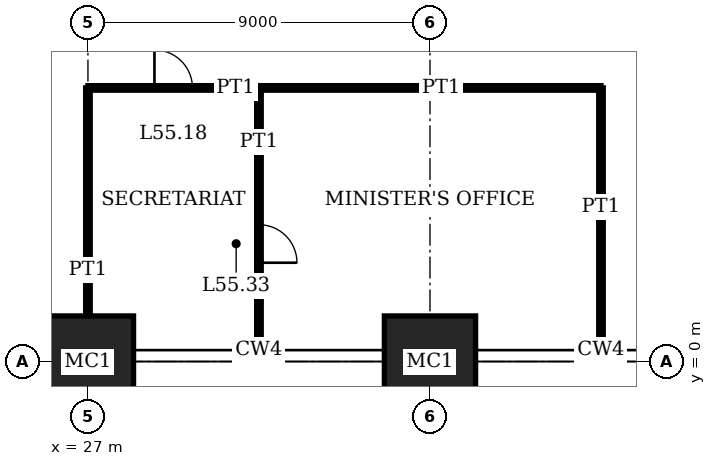
"""IFC4 building model, lengths in metres.
Left out: names, types, materials, properties, quantities, classifications, styles, units other than length and angle.
Written with IfcOpenShell. Run it as: python <this file> out.ifc"""

import sys

from ifc_helpers import new_model, si_unit, direction, frame, frame_2d, origin, origin_2d, place, context, subcontext, project, spatial, rectangle, extrude, element, fill, save


model = new_model("IFC4")
c1 = context("Model", 3, precision=1e-05, world=origin(), true_north=direction((0.0, 1.0)))
c2 = subcontext(c1, "Body", "Model", "MODEL_VIEW")
j1 = project(units=[si_unit("LENGTHUNIT", "METRE"), si_unit("PLANEANGLEUNIT", "RADIAN")], contexts=[c1])
p1 = place(None, origin())
s1 = spatial("IfcSite", under=j1, at=p1, CompositionType="ELEMENT")
p2 = place(p1, origin())
s2 = spatial("IfcBuilding", under=s1, at=p2, CompositionType="ELEMENT")
p3 = place(p2, frame((0.0, 0.0, 226.2)))
s3 = spatial("IfcBuildingStorey", under=s2, at=p3, CompositionType="ELEMENT", Elevation=226.2)
for number, where, z_axis, x_axis in (
    (1, (27.0, 0.0, 0.0), (0.0, 0.0, 1.0), (1.0, 0.0, 0.0)),
    (2, (36.0, 0.0, 0.0), (0.0, 0.0, 1.0), (1.0, 0.0, 0.0)),
):
    element("IfcColumn", number, at=place(p3, frame(where, z_axis=z_axis, x_axis=x_axis)), inside=s3, PredefinedType="COLUMN", context=c2, shape_type="SweptSolid", body=[
        extrude(rectangle(XDim=2.4, YDim=2.4, at=origin_2d()), origin(), (0.0, 0.0, 1.0), 4.0),
    ])
p4 = place(p3, frame((27.0, 7.2, 0.0), z_axis=(0.0, 0.0, 1.0), x_axis=(1.0, 0.0, 0.0)))
e3 = element("IfcWall", 3, at=p4, inside=s3, PredefinedType="PARTITIONING", context=c2, shape_type="SweptSolid", body=[
    extrude(rectangle(XDim=4.5, YDim=0.12, at=frame_2d((2.25, 0.0))), origin(), (0.0, 0.0, 1.0), 3.75),
])
p5 = place(p4, frame((1.75, 0.0, 0.0)))
e4 = element("IfcOpeningElement", 4, at=p5, cuts=e3, PredefinedType="OPENING", context=c2, shape_type="SweptSolid", body=[
    extrude(rectangle(XDim=1.0, YDim=2.4, at=frame_2d((0.5, 1.2))), frame((0.0, 0.07, 0.0), z_axis=(0.0, -1.0, 0.0), x_axis=(1.0, 0.0, 0.0)), (0.0, 0.0, 1.0), 0.14),
])
p6 = place(p3, frame((31.5, 7.2, 0.0), z_axis=(0.0, 0.0, 1.0), x_axis=(1.0, 0.0, 0.0)))
e5 = element("IfcWall", 5, at=p6, inside=s3, PredefinedType="PARTITIONING", context=c2, shape_type="SweptSolid", body=[
    extrude(rectangle(XDim=9.0, YDim=0.12, at=frame_2d((4.5, 0.0))), origin(), (0.0, 0.0, 1.0), 3.75),
])
p7 = place(p3, frame((27.0, 1.2, 0.0), z_axis=(0.0, 0.0, 1.0), x_axis=(0.0, 1.0, 0.0)))
e6 = element("IfcWall", 6, at=p7, inside=s3, PredefinedType="PARTITIONING", context=c2, shape_type="SweptSolid", body=[
    extrude(rectangle(XDim=6.0, YDim=0.12, at=frame_2d((3.0, 0.0))), origin(), (0.0, 0.0, 1.0), 3.05),
])
p8 = place(p3, frame((31.5, 0.31, 0.0), z_axis=(0.0, 0.0, 1.0), x_axis=(0.0, 1.0, 0.0)))
e7 = element("IfcWall", 7, at=p8, inside=s3, PredefinedType="PARTITIONING", context=c2, shape_type="SweptSolid", body=[
    extrude(rectangle(XDim=6.89, YDim=0.12, at=frame_2d((3.445, 0.0))), origin(), (0.0, 0.0, 1.0), 3.75),
])
p9 = place(p8, frame((2.29, 0.0, 0.0)))
e8 = element("IfcOpeningElement", 8, at=p9, cuts=e7, PredefinedType="OPENING", context=c2, shape_type="SweptSolid", body=[
    extrude(rectangle(XDim=1.0, YDim=2.4, at=frame_2d((0.5, 1.2))), frame((0.0, 0.07, 0.0), z_axis=(0.0, -1.0, 0.0), x_axis=(1.0, 0.0, 0.0)), (0.0, 0.0, 1.0), 0.14),
])
p10 = place(p3, frame((40.5, 0.31, 0.0), z_axis=(0.0, 0.0, 1.0), x_axis=(0.0, 1.0, 0.0)))
e9 = element("IfcWall", 9, at=p10, inside=s3, PredefinedType="PARTITIONING", context=c2, shape_type="SweptSolid", body=[
    extrude(rectangle(XDim=6.89, YDim=0.12, at=frame_2d((3.445, 0.0))), origin(), (0.0, 0.0, 1.0), 3.75),
])
p11 = place(p5, origin())
e10 = element("IfcDoor", 10, at=p11, inside=s3, OperationType="SINGLE_SWING_RIGHT", PredefinedType="DOOR", context=c2, shape_type="SweptSolid", body=[
    extrude(rectangle(XDim=1.0, YDim=2.4, at=frame_2d((0.5, 1.2))), frame((0.0, 0.025, 0.0), z_axis=(0.0, -1.0, 0.0), x_axis=(1.0, 0.0, 0.0)), (0.0, 0.0, 1.0), 0.05),
])
fill(e4, e10)
p12 = place(p9, origin())
e11 = element("IfcDoor", 11, at=p12, inside=s3, OperationType="SINGLE_SWING_LEFT", PredefinedType="DOOR", context=c2, shape_type="SweptSolid", body=[
    extrude(rectangle(XDim=1.0, YDim=2.4, at=frame_2d((0.5, 1.2))), frame((0.0, 0.025, 0.0), z_axis=(0.0, -1.0, 0.0), x_axis=(1.0, 0.0, 0.0)), (0.0, 0.0, 1.0), 0.05),
])
fill(e8, e11)
save(model, sys.argv[1])
